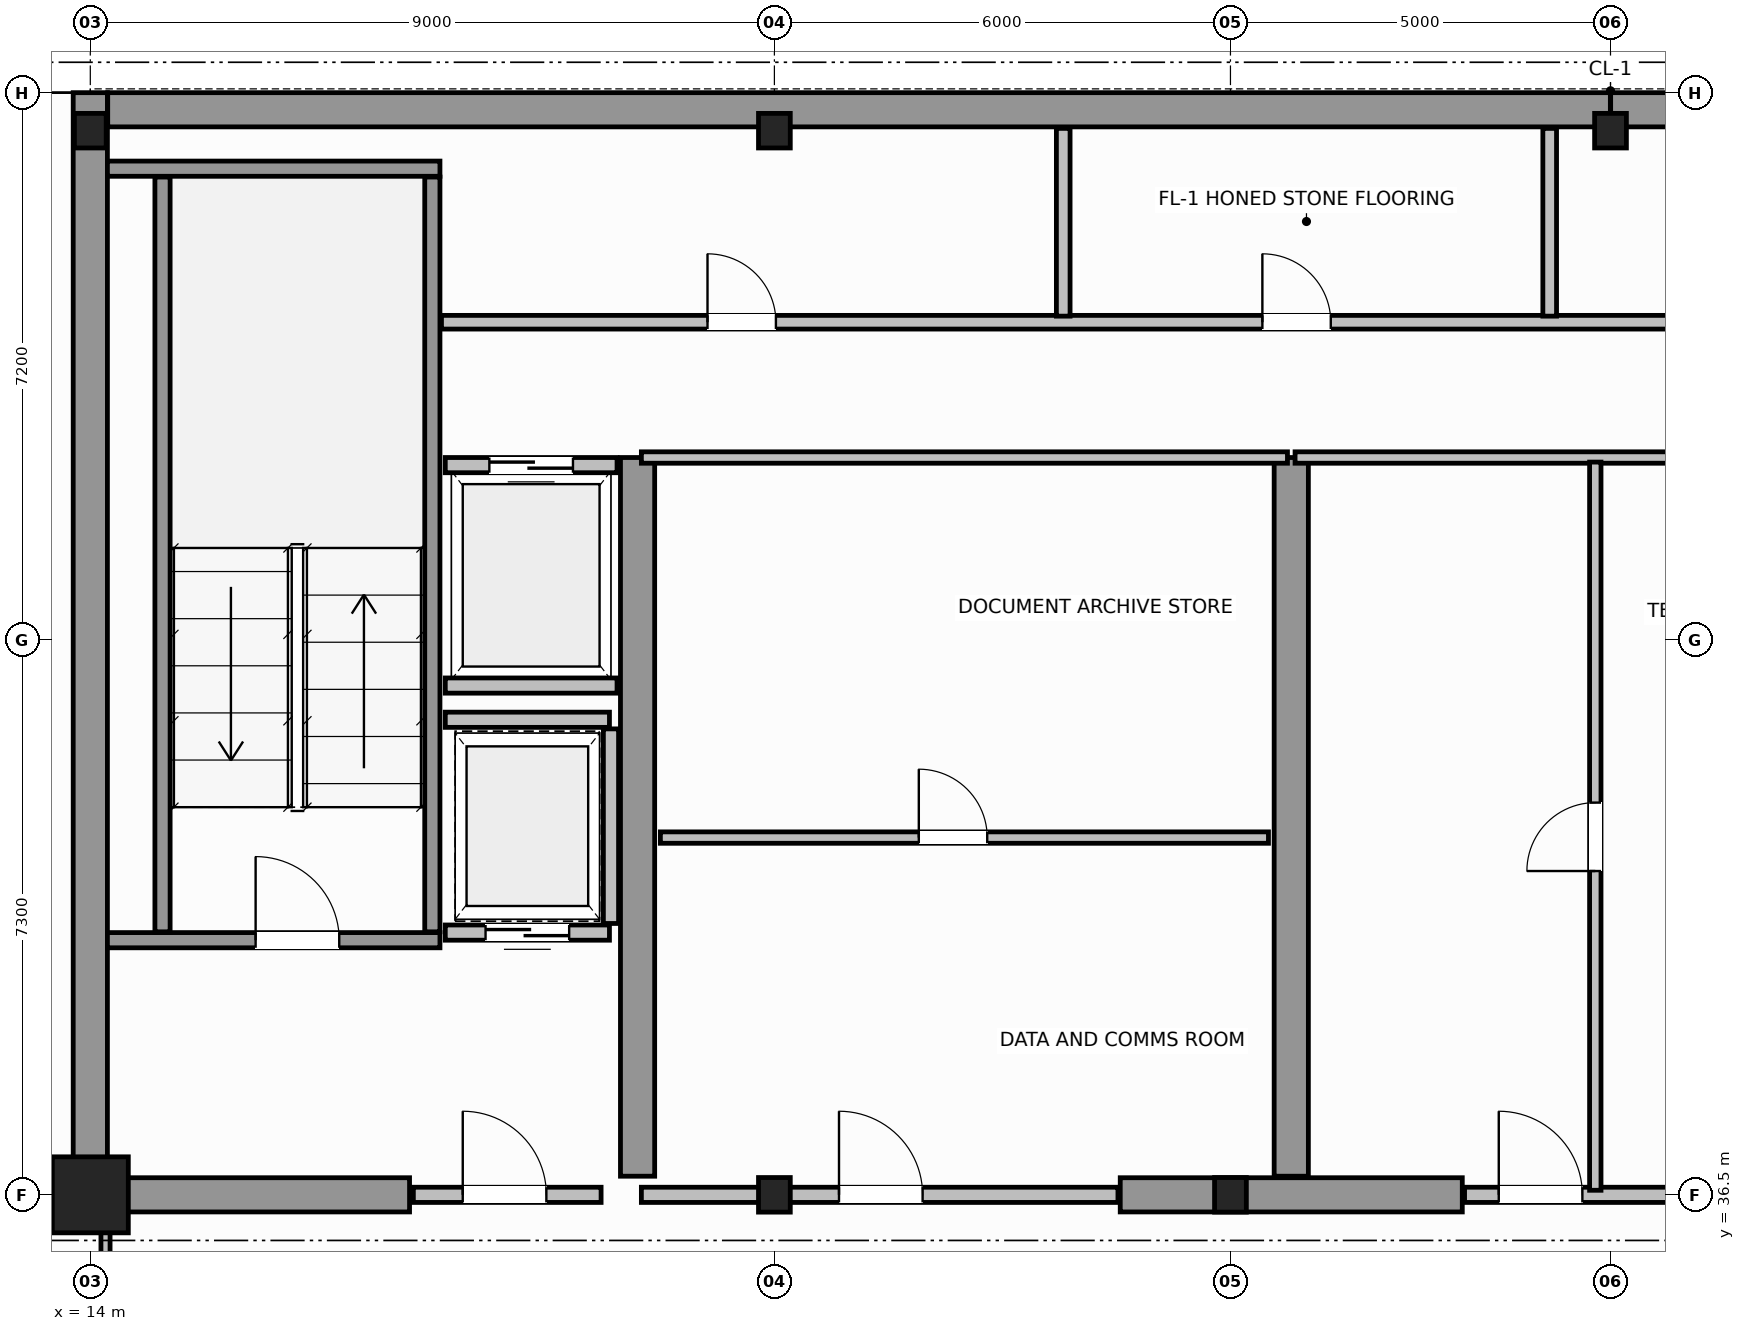
"""IFC4 building model, lengths in metres.
Left out: names, types, materials, properties, quantities, classifications, styles, units other than length and angle.
Written with IfcOpenShell. Run it as: python <this file> out.ifc"""

import sys

from ifc_helpers import new_model, si_unit, direction, frame, frame_2d, origin, origin_2d, place, context, subcontext, project, spatial, rectangle, i_section, extrude, source, transform, mapped, element, fill, save


model = new_model("IFC4")
c1 = context("Model", 3, precision=1e-05, world=origin(), true_north=direction((0.0, 1.0)))
c2 = subcontext(c1, "Body", "Model", "MODEL_VIEW")
j1 = project(units=[si_unit("LENGTHUNIT", "METRE"), si_unit("PLANEANGLEUNIT", "RADIAN")], contexts=[c1])
p1 = place(None, origin())
s1 = spatial("IfcSite", under=j1, at=p1, CompositionType="ELEMENT")
p2 = place(p1, origin())
s2 = spatial("IfcBuilding", under=s1, at=p2, CompositionType="ELEMENT")
p3 = place(p2, frame((0.0, 0.0, 257.4)))
s3 = spatial("IfcBuildingStorey", under=s2, at=p3, CompositionType="ELEMENT", Elevation=257.4)
m1 = source(origin(), c2, "Body", "SweptSolid", [
    extrude(rectangle(XDim=1.0, YDim=1.0, at=origin_2d()), origin(), (0.0, 0.0, 1.0), 3.8),
])
p4 = place(p3, frame((14.0, 36.5, 0.0), z_axis=(0.0, 0.0, 1.0), x_axis=(1.0, 0.0, 0.0)))
e1 = element("IfcColumn", 1, at=p4, inside=s3, PredefinedType="COLUMN", context=c2, shape_type="MappedRepresentation", body=[
    mapped(m1, transform((0.0, 0.0, 0.0), scale=1.0)),
])
m2 = source(origin(), c2, "Body", "SweptSolid", [
    extrude(i_section(OverallWidth=0.418, OverallDepth=0.455, WebThickness=0.042, FlangeThickness=0.058, FilletRadius=0.015, at=origin_2d()), origin(), (0.0, 0.0, 1.0), 3.8),
])
for number, where, z_axis, x_axis in (
    (2, (23.0, 36.5, 0.0), (0.0, 0.0, 1.0), (1.0, 0.0, 0.0)),
    (3, (29.0, 36.5, 0.0), (0.0, 0.0, 1.0), (1.0, 0.0, 0.0)),
    (4, (14.0, 50.5, 0.0), (0.0, 0.0, 1.0), (1.0, 0.0, 0.0)),
    (5, (23.0, 50.5, 0.0), (0.0, 0.0, 1.0), (1.0, 0.0, 0.0)),
    (6, (34.0, 50.5, 0.0), (0.0, 0.0, 1.0), (1.0, 0.0, 0.0)),
):
    element("IfcColumn", number, at=place(p3, frame(where, z_axis=z_axis, x_axis=x_axis)), inside=s3, PredefinedType="COLUMN", context=c2, shape_type="MappedRepresentation", body=[
        mapped(m2, transform((0.0, 0.0, 0.0), scale=1.0)),
    ])
for number, where, z_axis, x_axis in (
    (7, (14.229, 50.775, 0.0), (0.0, 0.0, 1.0), (1.0, 0.0, 0.0)),
    (8, (34.002, 50.775, 0.0), (0.0, 0.0, 1.0), (1.0, 0.0, 0.0)),
):
    element("IfcWall", number, at=place(p3, frame(where, z_axis=z_axis, x_axis=x_axis)), inside=s3, PredefinedType="SHEAR", context=c2, shape_type="SweptSolid", body=[
        extrude(rectangle(XDim=19.769, YDim=0.45, at=frame_2d((9.885, 0.0))), origin(), (0.0, 0.0, 1.0), 3.8),
    ])
p5 = place(p3, frame((14.0, 36.5, 0.0), z_axis=(0.0, 0.0, 1.0), x_axis=(0.0, 1.0, 0.0)))
e9 = element("IfcWall", 9, at=p5, inside=s3, PredefinedType="SHEAR", context=c2, shape_type="SweptSolid", body=[
    extrude(rectangle(XDim=14.5, YDim=0.45, at=frame_2d((7.25, 0.0))), origin(), (0.0, 0.0, 1.0), 3.8),
])
p6 = place(p3, frame((14.245, 36.5, 0.0), z_axis=(0.0, 0.0, 1.0), x_axis=(1.0, 0.0, 0.0)))
e10 = element("IfcWall", 10, at=p6, inside=s3, PredefinedType="SHEAR", context=c2, shape_type="SweptSolid", body=[
    extrude(rectangle(XDim=3.955, YDim=0.45, at=frame_2d((1.978, 0.0))), origin(), (0.0, 0.0, 1.0), 2.58),
])
p7 = place(p3, frame((27.55, 36.5, 0.0), z_axis=(0.0, 0.0, 1.0), x_axis=(1.0, 0.0, 0.0)))
e11 = element("IfcWall", 11, at=p7, inside=s3, PredefinedType="SHEAR", context=c2, shape_type="SweptSolid", body=[
    extrude(rectangle(XDim=4.5, YDim=0.45, at=frame_2d((2.25, 0.0))), origin(), (0.0, 0.0, 1.0), 3.8),
])
for number, where, z_axis, x_axis in (
    (12, (21.2, 36.745, 0.0), (0.0, 0.0, 1.0), (0.0, 1.0, 0.0)),
    (13, (29.8, 36.745, 0.0), (0.0, 0.0, 1.0), (0.0, 1.0, 0.0)),
):
    element("IfcWall", number, at=place(p3, frame(where, z_axis=z_axis, x_axis=x_axis)), inside=s3, PredefinedType="SHEAR", context=c2, shape_type="SweptSolid", body=[
        extrude(rectangle(XDim=9.455, YDim=0.45, at=frame_2d((4.728, 0.0))), origin(), (0.0, 0.0, 1.0), 3.8),
    ])
p8 = place(p3, frame((14.225, 39.85, 0.0), z_axis=(0.0, 0.0, 1.0), x_axis=(1.0, 0.0, 0.0)))
e14 = element("IfcWall", 14, at=p8, inside=s3, PredefinedType="SOLIDWALL", context=c2, shape_type="SweptSolid", body=[
    extrude(rectangle(XDim=4.375, YDim=0.2, at=frame_2d((2.188, 0.0))), origin(), (0.0, 0.0, 1.0), 3.8),
])
p9 = place(p8, frame((1.95, 0.0, 0.0)))
e15 = element("IfcOpeningElement", 15, at=p9, cuts=e14, PredefinedType="OPENING", context=c2, shape_type="SweptSolid", body=[
    extrude(rectangle(XDim=1.1, YDim=2.15, at=frame_2d((0.55, 1.075))), frame((0.0, 0.11, 0.0), z_axis=(0.0, -1.0, 0.0), x_axis=(1.0, 0.0, 0.0)), (0.0, 0.0, 1.0), 0.22),
])
p10 = place(p3, frame((14.225, 50.0, 0.0), z_axis=(0.0, 0.0, 1.0), x_axis=(1.0, 0.0, 0.0)))
e16 = element("IfcWall", 16, at=p10, inside=s3, PredefinedType="SOLIDWALL", context=c2, shape_type="SweptSolid", body=[
    extrude(rectangle(XDim=4.375, YDim=0.2, at=frame_2d((2.188, 0.0))), origin(), (0.0, 0.0, 1.0), 3.8),
])
for number, where, z_axis, x_axis in (
    (17, (14.95, 39.96, 0.0), (0.0, 0.0, 1.0), (0.0, 1.0, 0.0)),
    (18, (18.5, 39.96, 0.0), (0.0, 0.0, 1.0), (0.0, 1.0, 0.0)),
):
    element("IfcWall", number, at=place(p3, frame(where, z_axis=z_axis, x_axis=x_axis)), inside=s3, PredefinedType="SOLIDWALL", context=c2, shape_type="SweptSolid", body=[
        extrude(rectangle(XDim=9.93, YDim=0.2, at=frame_2d((4.965, 0.0))), origin(), (0.0, 0.0, 1.0), 3.8),
    ])
p11 = place(p3, frame((18.25, 36.5, 0.0), z_axis=(0.0, 0.0, 1.0), x_axis=(1.0, 0.0, 0.0)))
e19 = element("IfcWall", 19, at=p11, inside=s3, PredefinedType="SOLIDWALL", context=c2, shape_type="SweptSolid", body=[
    extrude(rectangle(XDim=2.47, YDim=0.2, at=frame_2d((1.235, 0.0))), origin(), (0.0, 0.0, 1.0), 2.57),
])
p12 = place(p11, frame((0.65, 0.0, 0.0)))
e20 = element("IfcOpeningElement", 20, at=p12, cuts=e19, PredefinedType="OPENING", context=c2, shape_type="SweptSolid", body=[
    extrude(rectangle(XDim=1.1, YDim=2.15, at=frame_2d((0.55, 1.075))), frame((0.0, 0.11, 0.0), z_axis=(0.0, -1.0, 0.0), x_axis=(1.0, 0.0, 0.0)), (0.0, 0.0, 1.0), 0.22),
])
p13 = place(p3, frame((18.67, 46.1, 0.0), z_axis=(0.0, 0.0, 1.0), x_axis=(1.0, 0.0, 0.0)))
e21 = element("IfcWall", 21, at=p13, inside=s3, PredefinedType="SOLIDWALL", context=c2, shape_type="SweptSolid", body=[
    extrude(rectangle(XDim=2.26, YDim=0.2, at=frame_2d((1.13, 0.0))), origin(), (0.0, 0.0, 1.0), 3.58),
])
p14 = place(p13, frame((0.58, 0.0, 0.0)))
e22 = element("IfcOpeningElement", 22, at=p14, cuts=e21, PredefinedType="OPENING", context=c2, shape_type="SweptSolid", body=[
    extrude(rectangle(XDim=1.1, YDim=2.15, at=frame_2d((0.55, 1.075))), frame((0.0, 0.11, 0.0), z_axis=(0.0, -1.0, 0.0), x_axis=(1.0, 0.0, 0.0)), (0.0, 0.0, 1.0), 0.22),
])
p15 = place(p3, frame((18.67, 43.2, 0.0), z_axis=(0.0, 0.0, 1.0), x_axis=(1.0, 0.0, 0.0)))
e23 = element("IfcWall", 23, at=p15, inside=s3, PredefinedType="SOLIDWALL", context=c2, shape_type="SweptSolid", body=[
    extrude(rectangle(XDim=2.26, YDim=0.2, at=frame_2d((1.13, 0.0))), origin(), (0.0, 0.0, 1.0), 3.58),
])
p16 = place(p3, frame((18.67, 39.95, 0.0), z_axis=(0.0, 0.0, 1.0), x_axis=(1.0, 0.0, 0.0)))
e24 = element("IfcWall", 24, at=p16, inside=s3, PredefinedType="SOLIDWALL", context=c2, shape_type="SweptSolid", body=[
    extrude(rectangle(XDim=2.16, YDim=0.2, at=frame_2d((1.08, 0.0))), origin(), (0.0, 0.0, 1.0), 3.58),
])
p17 = place(p16, frame((0.53, 0.0, 0.0)))
e25 = element("IfcOpeningElement", 25, at=p17, cuts=e24, PredefinedType="OPENING", context=c2, shape_type="SweptSolid", body=[
    extrude(rectangle(XDim=1.1, YDim=2.15, at=frame_2d((0.55, 1.075))), frame((0.0, 0.11, 0.0), z_axis=(0.0, -1.0, 0.0), x_axis=(1.0, 0.0, 0.0)), (0.0, 0.0, 1.0), 0.22),
])
p18 = place(p3, frame((18.67, 42.75, 0.0), z_axis=(0.0, 0.0, 1.0), x_axis=(1.0, 0.0, 0.0)))
e26 = element("IfcWall", 26, at=p18, inside=s3, PredefinedType="SOLIDWALL", context=c2, shape_type="SweptSolid", body=[
    extrude(rectangle(XDim=2.16, YDim=0.2, at=frame_2d((1.08, 0.0))), origin(), (0.0, 0.0, 1.0), 3.58),
])
p19 = place(p3, frame((20.85, 40.07, 0.0), z_axis=(0.0, 0.0, 1.0), x_axis=(0.0, 1.0, 0.0)))
e27 = element("IfcWall", 27, at=p19, inside=s3, PredefinedType="SOLIDWALL", context=c2, shape_type="SweptSolid", body=[
    extrude(rectangle(XDim=2.56, YDim=0.2, at=frame_2d((1.28, 0.0))), origin(), (0.0, 0.0, 1.0), 3.58),
])
p20 = place(p3, frame((21.25, 36.5, 0.0), z_axis=(0.0, 0.0, 1.0), x_axis=(1.0, 0.0, 0.0)))
e28 = element("IfcWall", 28, at=p20, inside=s3, PredefinedType="SOLIDWALL", context=c2, shape_type="SweptSolid", body=[
    extrude(rectangle(XDim=6.27, YDim=0.2, at=frame_2d((3.135, 0.0))), origin(), (0.0, 0.0, 1.0), 2.57),
])
p21 = place(p20, frame((2.6, 0.0, 0.0)))
e29 = element("IfcOpeningElement", 29, at=p21, cuts=e28, PredefinedType="OPENING", context=c2, shape_type="SweptSolid", body=[
    extrude(rectangle(XDim=1.1, YDim=2.15, at=frame_2d((0.55, 1.075))), frame((0.0, 0.11, 0.0), z_axis=(0.0, -1.0, 0.0), x_axis=(1.0, 0.0, 0.0)), (0.0, 0.0, 1.0), 0.22),
])
p22 = place(p3, frame((21.25, 46.2, 0.0), z_axis=(0.0, 0.0, 1.0), x_axis=(1.0, 0.0, 0.0)))
e30 = element("IfcWall", 30, at=p22, inside=s3, PredefinedType="PARTITIONING", context=c2, shape_type="SweptSolid", body=[
    extrude(rectangle(XDim=8.5, YDim=0.15, at=frame_2d((4.25, 0.0))), origin(), (0.0, 0.0, 1.0), 3.58),
])
p23 = place(p3, frame((21.5, 41.2, 0.0), z_axis=(0.0, 0.0, 1.0), x_axis=(1.0, 0.0, 0.0)))
e31 = element("IfcWall", 31, at=p23, inside=s3, PredefinedType="PARTITIONING", context=c2, shape_type="SweptSolid", body=[
    extrude(rectangle(XDim=8.0, YDim=0.15, at=frame_2d((4.0, 0.0))), origin(), (0.0, 0.0, 1.0), 3.58),
])
p24 = place(p23, frame((3.4, 0.0, 0.0)))
e32 = element("IfcOpeningElement", 32, at=p24, cuts=e31, PredefinedType="OPENING", context=c2, shape_type="SweptSolid", body=[
    extrude(rectangle(XDim=0.9, YDim=2.1, at=frame_2d((0.45, 1.05))), frame((0.0, 0.085, 0.0), z_axis=(0.0, -1.0, 0.0), x_axis=(1.0, 0.0, 0.0)), (0.0, 0.0, 1.0), 0.17),
])
p25 = place(p3, frame((32.08, 36.5, 0.0), z_axis=(0.0, 0.0, 1.0), x_axis=(1.0, 0.0, 0.0)))
e33 = element("IfcWall", 33, at=p25, inside=s3, PredefinedType="SOLIDWALL", context=c2, shape_type="SweptSolid", body=[
    extrude(rectangle(XDim=4.04, YDim=0.2, at=frame_2d((2.02, 0.0))), origin(), (0.0, 0.0, 1.0), 3.02),
])
p26 = place(p25, frame((0.45, 0.0, 0.0)))
e34 = element("IfcOpeningElement", 34, at=p26, cuts=e33, PredefinedType="OPENING", context=c2, shape_type="SweptSolid", body=[
    extrude(rectangle(XDim=1.1, YDim=2.15, at=frame_2d((0.55, 1.075))), frame((0.0, 0.11, 0.0), z_axis=(0.0, -1.0, 0.0), x_axis=(1.0, 0.0, 0.0)), (0.0, 0.0, 1.0), 0.22),
])
p27 = place(p3, frame((29.85, 46.2, 0.0), z_axis=(0.0, 0.0, 1.0), x_axis=(1.0, 0.0, 0.0)))
e35 = element("IfcWall", 35, at=p27, inside=s3, PredefinedType="PARTITIONING", context=c2, shape_type="SweptSolid", body=[
    extrude(rectangle(XDim=8.5, YDim=0.15, at=frame_2d((4.25, 0.0))), origin(), (0.0, 0.0, 1.0), 3.58),
])
p28 = place(p3, frame((33.8, 36.56, 0.0), z_axis=(0.0, 0.0, 1.0), x_axis=(0.0, 1.0, 0.0)))
e36 = element("IfcWall", 36, at=p28, inside=s3, PredefinedType="PARTITIONING", context=c2, shape_type="SweptSolid", body=[
    extrude(rectangle(XDim=9.58, YDim=0.15, at=frame_2d((4.79, 0.0))), origin(), (0.0, 0.0, 1.0), 3.58),
])
p29 = place(p28, frame((4.2, 0.0, 0.0)))
e37 = element("IfcOpeningElement", 37, at=p29, cuts=e36, PredefinedType="OPENING", context=c2, shape_type="SweptSolid", body=[
    extrude(rectangle(XDim=0.9, YDim=2.1, at=frame_2d((0.45, 1.05))), frame((0.0, 0.085, 0.0), z_axis=(0.0, -1.0, 0.0), x_axis=(1.0, 0.0, 0.0)), (0.0, 0.0, 1.0), 0.17),
])
p30 = place(p3, frame((18.62, 47.98, 0.0), z_axis=(0.0, 0.0, 1.0), x_axis=(1.0, 0.0, 0.0)))
e38 = element("IfcWall", 38, at=p30, inside=s3, PredefinedType="PLUMBINGWALL", context=c2, shape_type="SweptSolid", body=[
    extrude(rectangle(XDim=20.06, YDim=0.18, at=frame_2d((10.03, 0.0))), origin(), (0.0, 0.0, 1.0), 3.58),
])
p31 = place(p30, frame((3.5, 0.0, 0.0)))
e39 = element("IfcOpeningElement", 39, at=p31, cuts=e38, PredefinedType="OPENING", context=c2, shape_type="SweptSolid", body=[
    extrude(rectangle(XDim=0.9, YDim=2.15, at=frame_2d((0.45, 1.075))), frame((0.0, 0.1, 0.0), z_axis=(0.0, -1.0, 0.0), x_axis=(1.0, 0.0, 0.0)), (0.0, 0.0, 1.0), 0.2),
])
p32 = place(p30, frame((10.8, 0.0, 0.0)))
e40 = element("IfcOpeningElement", 40, at=p32, cuts=e38, PredefinedType="OPENING", context=c2, shape_type="SweptSolid", body=[
    extrude(rectangle(XDim=0.9, YDim=2.15, at=frame_2d((0.45, 1.075))), frame((0.0, 0.1, 0.0), z_axis=(0.0, -1.0, 0.0), x_axis=(1.0, 0.0, 0.0)), (0.0, 0.0, 1.0), 0.2),
])
p33 = place(p30, frame((16.8, 0.0, 0.0)))
e41 = element("IfcOpeningElement", 41, at=p33, cuts=e38, PredefinedType="OPENING", context=c2, shape_type="SweptSolid", body=[
    extrude(rectangle(XDim=0.9, YDim=2.15, at=frame_2d((0.45, 1.075))), frame((0.0, 0.1, 0.0), z_axis=(0.0, -1.0, 0.0), x_axis=(1.0, 0.0, 0.0)), (0.0, 0.0, 1.0), 0.2),
])
for number, where, z_axis, x_axis in (
    (42, (26.8, 48.06, 0.0), (0.0, 0.0, 1.0), (0.0, 1.0, 0.0)),
    (43, (33.2, 48.06, 0.0), (0.0, 0.0, 1.0), (0.0, 1.0, 0.0)),
):
    element("IfcWall", number, at=place(p3, frame(where, z_axis=z_axis, x_axis=x_axis)), inside=s3, PredefinedType="PLUMBINGWALL", context=c2, shape_type="SweptSolid", body=[
        extrude(rectangle(XDim=2.47, YDim=0.18, at=frame_2d((1.235, 0.0))), origin(), (0.0, 0.0, 1.0), 3.58),
    ])
p34 = place(p3, frame((14.2, 34.0, 0.0), z_axis=(0.0, 0.0, 1.0), x_axis=(0.0, 1.0, 0.0)))
e44 = element("IfcWall", 44, at=p34, inside=s3, PredefinedType="PARTITIONING", context=c2, shape_type="SweptSolid", body=[
    extrude(rectangle(XDim=2.44, YDim=0.12, at=frame_2d((1.22, 0.0))), origin(), (0.0, 0.0, 1.0), 3.58),
])
p35 = place(p34, frame((0.7, 0.0, 0.0)))
e45 = element("IfcOpeningElement", 45, at=p35, cuts=e44, PredefinedType="OPENING", context=c2, shape_type="SweptSolid", body=[
    extrude(rectangle(XDim=0.9, YDim=2.15, at=frame_2d((0.45, 1.075))), frame((0.0, 0.07, 0.0), z_axis=(0.0, -1.0, 0.0), x_axis=(1.0, 0.0, 0.0)), (0.0, 0.0, 1.0), 0.14),
])
m3 = source(origin(), c2, "Body", "SweptSolid", [
    extrude(rectangle(XDim=1.1, YDim=2.15, at=frame_2d((0.55, 1.075))), frame((0.0, 0.025, 0.0), z_axis=(0.0, -1.0, 0.0), x_axis=(1.0, 0.0, 0.0)), (0.0, 0.0, 1.0), 0.05),
])
p36 = place(p9, origin())
e46 = element("IfcDoor", 46, at=p36, inside=s3, OperationType="SINGLE_SWING_LEFT", PredefinedType="DOOR", context=c2, shape_type="MappedRepresentation", body=[
    mapped(m3, transform((0.0, 0.0, 0.0), scale=1.0)),
])
fill(e15, e46)
p37 = place(p12, origin())
e47 = element("IfcDoor", 47, at=p37, inside=s3, OperationType="SINGLE_SWING_RIGHT", PredefinedType="DOOR", context=c2, shape_type="MappedRepresentation", body=[
    mapped(m3, transform((0.0, 0.0, 0.0), scale=1.0)),
])
fill(e20, e47)
p38 = place(p14, origin())
e48 = element("IfcDoor", 48, at=p38, inside=s3, OperationType="DOUBLE_DOOR_SLIDING", PredefinedType="DOOR", context=c2, shape_type="MappedRepresentation", body=[
    mapped(m3, transform((0.0, 0.0, 0.0), scale=1.0)),
])
fill(e22, e48)
p39 = place(p17, origin())
e49 = element("IfcDoor", 49, at=p39, inside=s3, OperationType="DOUBLE_DOOR_SLIDING", PredefinedType="DOOR", context=c2, shape_type="MappedRepresentation", body=[
    mapped(m3, transform((0.0, 0.0, 0.0), scale=1.0)),
])
fill(e25, e49)
p40 = place(p21, origin())
e50 = element("IfcDoor", 50, at=p40, inside=s3, OperationType="SINGLE_SWING_LEFT", PredefinedType="DOOR", context=c2, shape_type="MappedRepresentation", body=[
    mapped(m3, transform((0.0, 0.0, 0.0), scale=1.0)),
])
fill(e29, e50)
m4 = source(origin(), c2, "Body", "SweptSolid", [
    extrude(rectangle(XDim=0.9, YDim=2.1, at=frame_2d((0.45, 1.05))), frame((0.0, 0.025, 0.0), z_axis=(0.0, -1.0, 0.0), x_axis=(1.0, 0.0, 0.0)), (0.0, 0.0, 1.0), 0.05),
])
p41 = place(p24, origin())
e51 = element("IfcDoor", 51, at=p41, inside=s3, OperationType="SINGLE_SWING_RIGHT", PredefinedType="DOOR", context=c2, shape_type="MappedRepresentation", body=[
    mapped(m4, transform((0.0, 0.0, 0.0), scale=1.0)),
])
fill(e32, e51)
p42 = place(p26, origin())
e52 = element("IfcDoor", 52, at=p42, inside=s3, OperationType="SINGLE_SWING_LEFT", PredefinedType="DOOR", context=c2, shape_type="MappedRepresentation", body=[
    mapped(m3, transform((0.0, 0.0, 0.0), scale=1.0)),
])
fill(e34, e52)
p43 = place(p29, origin())
e53 = element("IfcDoor", 53, at=p43, inside=s3, OperationType="SINGLE_SWING_RIGHT", PredefinedType="DOOR", context=c2, shape_type="MappedRepresentation", body=[
    mapped(m4, transform((0.0, 0.0, 0.0), scale=1.0)),
])
fill(e37, e53)
m5 = source(origin(), c2, "Body", "SweptSolid", [
    extrude(rectangle(XDim=0.9, YDim=2.15, at=frame_2d((0.45, 1.075))), frame((0.0, 0.025, 0.0), z_axis=(0.0, -1.0, 0.0), x_axis=(1.0, 0.0, 0.0)), (0.0, 0.0, 1.0), 0.05),
])
p44 = place(p31, origin())
e54 = element("IfcDoor", 54, at=p44, inside=s3, OperationType="SINGLE_SWING_LEFT", PredefinedType="DOOR", context=c2, shape_type="MappedRepresentation", body=[
    mapped(m5, transform((0.0, 0.0, 0.0), scale=1.0)),
])
fill(e39, e54)
p45 = place(p32, origin())
e55 = element("IfcDoor", 55, at=p45, inside=s3, OperationType="SINGLE_SWING_RIGHT", PredefinedType="DOOR", context=c2, shape_type="MappedRepresentation", body=[
    mapped(m5, transform((0.0, 0.0, 0.0), scale=1.0)),
])
fill(e40, e55)
save(model, sys.argv[1])
